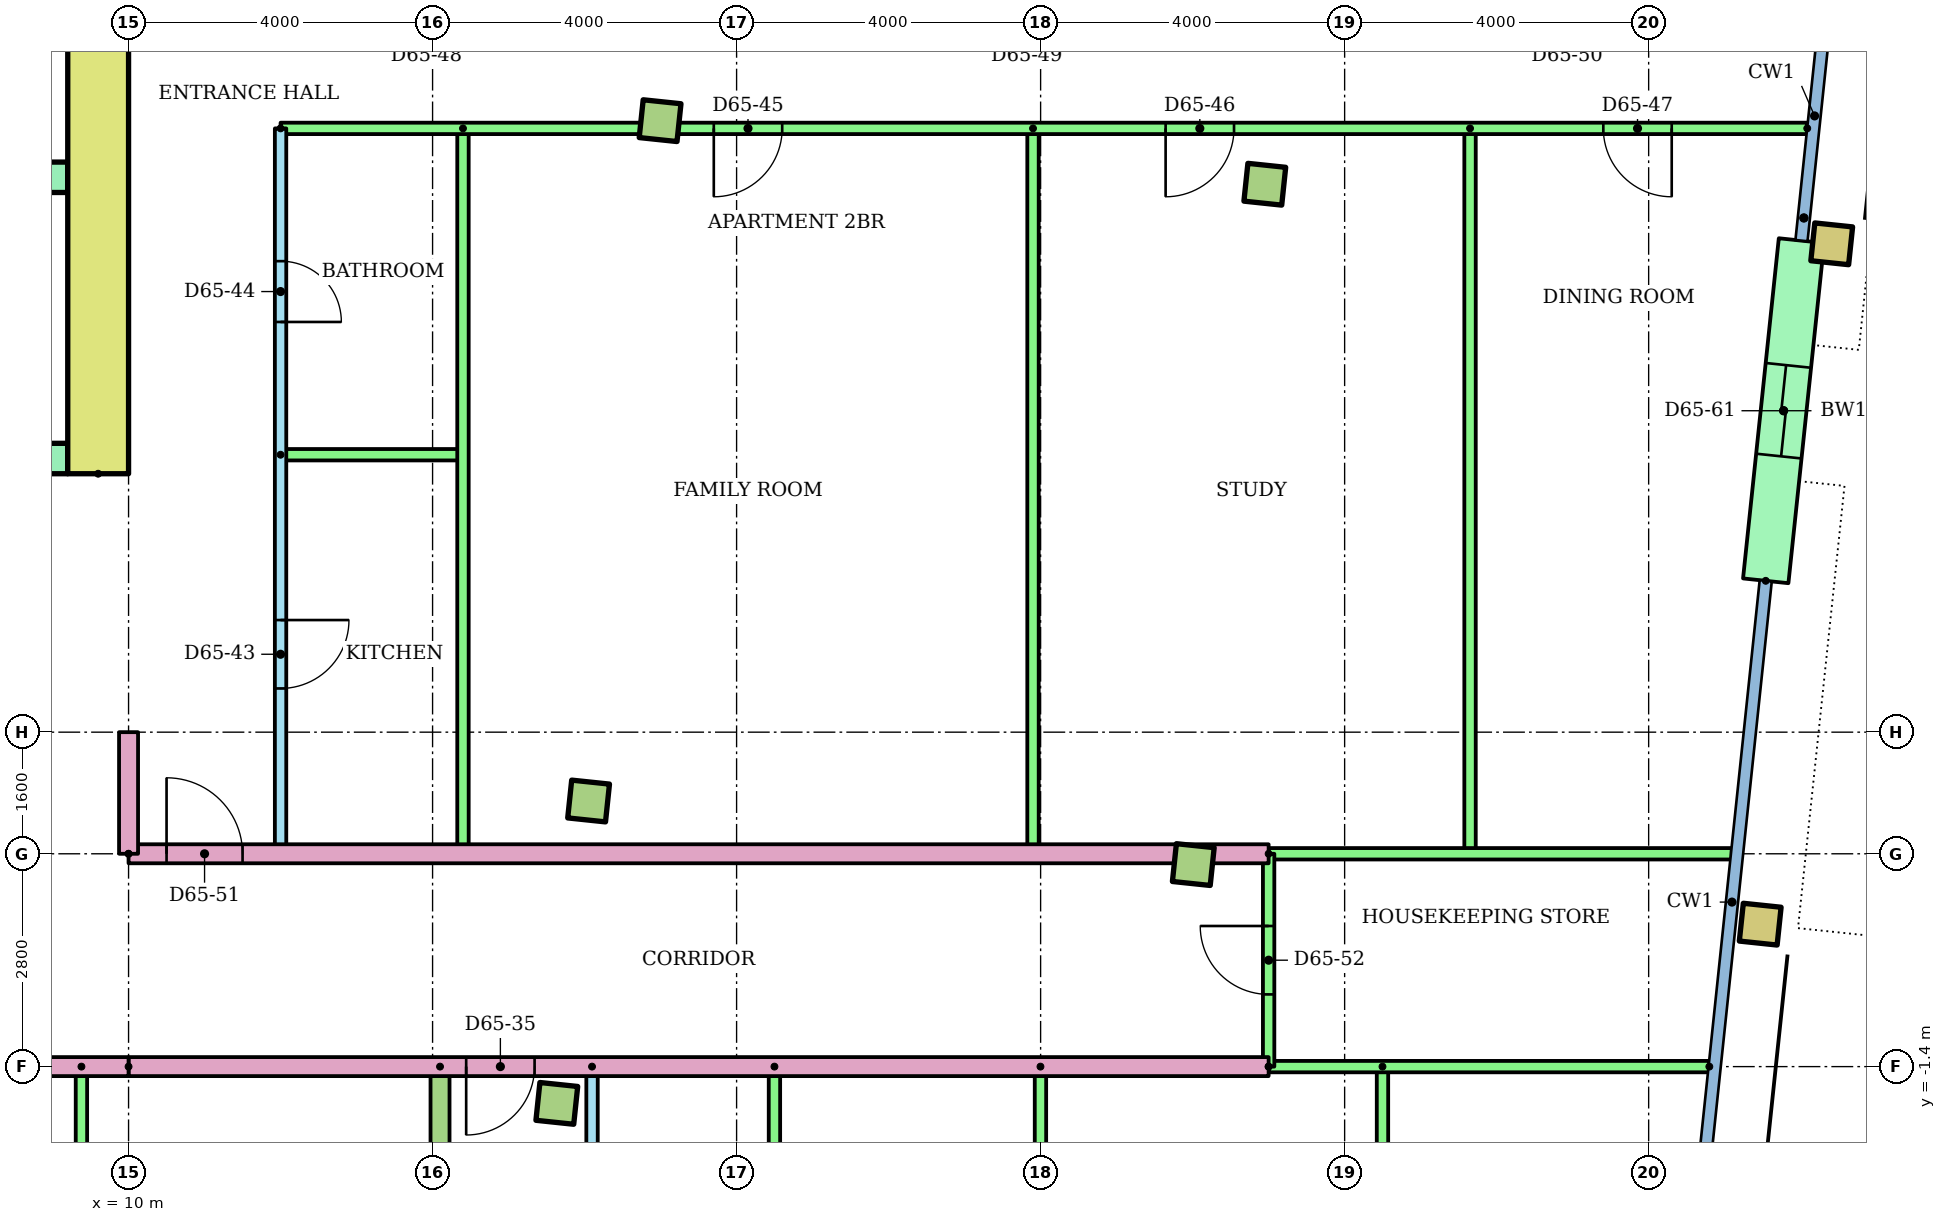
"""IFC4 building model, lengths in metres.
Left out: names, types, materials, properties, quantities, classifications, styles, units other than length and angle.
Written with IfcOpenShell. Run it as: python <this file> out.ifc"""

import sys

from ifc_helpers import new_model, si_unit, direction, frame, frame_2d, origin, origin_2d, place, context, subcontext, project, spatial, rectangle, hollow_rectangle, extrude, element, fill, save


model = new_model("IFC4")
c1 = context("Model", 3, precision=1e-05, world=origin(), true_north=direction((0.0, 1.0)))
c2 = subcontext(c1, "Body", "Model", "MODEL_VIEW")
j1 = project(units=[si_unit("LENGTHUNIT", "METRE"), si_unit("PLANEANGLEUNIT", "RADIAN")], contexts=[c1])
p1 = place(None, origin())
s1 = spatial("IfcSite", under=j1, at=p1, CompositionType="ELEMENT")
p2 = place(p1, origin())
s2 = spatial("IfcBuilding", under=s1, at=p2, CompositionType="ELEMENT")
p3 = place(p2, frame((0.0, 0.0, 253.1)))
s3 = spatial("IfcBuildingStorey", under=s2, at=p3, CompositionType="ELEMENT", Elevation=253.1)
for number, where, z_axis, x_axis in (
    (1, (15.635, -1.884, 0.0), (0.0, 0.0, 1.0), (0.995, -0.105, 0.0)),
    (2, (16.053, 2.094, 0.0), (0.0, 0.0, 1.0), (0.995, -0.105, 0.0)),
    (3, (24.009, 1.258, 0.0), (0.0, 0.0, 1.0), (0.995, -0.105, 0.0)),
):
    element("IfcColumn", number, at=place(p3, frame(where, z_axis=z_axis, x_axis=x_axis)), inside=s3, PredefinedType="COLUMN", context=c2, shape_type="SweptSolid", body=[
        extrude(rectangle(XDim=0.5, YDim=0.5, at=origin_2d()), origin(), (0.0, 0.0, 1.0), 3.2),
    ])
p4 = place(p3, frame((31.468, 0.474, 0.0), z_axis=(0.0, 0.0, 1.0), x_axis=(0.994521895368, -0.104528463268, 0.0)))
e4 = element("IfcColumn", 4, at=p4, inside=s3, PredefinedType="COLUMN", context=c2, shape_type="SweptSolid", body=[
    extrude(hollow_rectangle(XDim=0.5, YDim=0.5, WallThickness=0.025, at=origin_2d()), origin(), (0.0, 0.0, 1.0), 3.2),
])
for number, where, z_axis, x_axis in (
    (5, (16.993, 11.045, 0.0), (0.0, 0.0, 1.0), (0.995, -0.105, 0.0)),
    (6, (24.95, 10.209, 0.0), (0.0, 0.0, 1.0), (0.995, -0.105, 0.0)),
):
    element("IfcColumn", number, at=place(p3, frame(where, z_axis=z_axis, x_axis=x_axis)), inside=s3, PredefinedType="COLUMN", context=c2, shape_type="SweptSolid", body=[
        extrude(rectangle(XDim=0.5, YDim=0.5, at=origin_2d()), origin(), (0.0, 0.0, 1.0), 3.2),
    ])
p5 = place(p3, frame((32.409, 9.425, 0.0), z_axis=(0.0, 0.0, 1.0), x_axis=(0.994521895368, -0.104528463268, 0.0)))
e7 = element("IfcColumn", 7, at=p5, inside=s3, PredefinedType="COLUMN", context=c2, shape_type="SweptSolid", body=[
    extrude(hollow_rectangle(XDim=0.5, YDim=0.5, WallThickness=0.025, at=origin_2d()), origin(), (0.0, 0.0, 1.0), 3.2),
])
p6 = place(p3, frame((31.54, 4.991, 0.0), z_axis=(0.0, 0.0, 1.0), x_axis=(0.104546400045, 0.994520009974, 0.0)))
e8 = element("IfcWall", 8, at=p6, inside=s3, PredefinedType="STANDARD", context=c2, shape_type="SweptSolid", body=[
    extrude(rectangle(XDim=4.5, YDim=0.6, at=frame_2d((2.25, 0.0))), origin(), (0.0, 0.0, 1.0), 2.92),
])
p7 = place(p6, frame((1.65, 0.0, 0.0)))
e9 = element("IfcOpeningElement", 9, at=p7, cuts=e8, PredefinedType="OPENING", context=c2, shape_type="SweptSolid", body=[
    extrude(rectangle(XDim=1.2, YDim=2.1, at=frame_2d((0.6, 1.05))), frame((0.0, 0.31, 0.0), z_axis=(0.0, -1.0, 0.0), x_axis=(1.0, 0.0, 0.0)), (0.0, 0.0, 1.0), 0.62),
])
p8 = place(p3, frame((9.6, 6.4, 0.0), z_axis=(0.0, 0.0, 1.0), x_axis=(0.0, 1.0, 0.0)))
e10 = element("IfcWall", 10, at=p8, inside=s3, PredefinedType="SHEAR", context=c2, shape_type="SweptSolid", body=[
    extrude(rectangle(XDim=13.6, YDim=0.8, at=frame_2d((6.8, 0.0))), origin(), (0.0, 0.0, 1.0), 2.92),
])
p9 = place(p3, frame((-9.2, 6.6, 0.0)))
e11 = element("IfcWall", 11, at=p9, inside=s3, PredefinedType="SHEAR", context=c2, shape_type="SweptSolid", body=[
    extrude(rectangle(XDim=18.4, YDim=0.4, at=frame_2d((9.2, 0.0))), origin(), (0.0, 0.0, 1.0), 2.92),
])
p10 = place(p9, frame((8.3, 0.0, 0.0)))
e12 = element("IfcOpeningElement", 12, at=p10, cuts=e11, PredefinedType="OPENING", context=c2, shape_type="SweptSolid", body=[
    extrude(rectangle(XDim=1.8, YDim=2.1, at=frame_2d((0.9, 1.05))), frame((0.0, 0.21, 0.0), z_axis=(0.0, -1.0, 0.0), x_axis=(1.0, 0.0, 0.0)), (0.0, 0.0, 1.0), 0.42),
])
p11 = place(p9, frame((3.8, 0.0, 0.0)))
e13 = element("IfcOpeningElement", 13, at=p11, cuts=e11, PredefinedType="OPENING", context=c2, shape_type="SweptSolid", body=[
    extrude(rectangle(XDim=1.8, YDim=2.1, at=frame_2d((0.9, 1.05))), frame((0.0, 0.21, 0.0), z_axis=(0.0, -1.0, 0.0), x_axis=(1.0, 0.0, 0.0)), (0.0, 0.0, 1.0), 0.42),
])
p12 = place(p9, frame((12.8, 0.0, 0.0)))
e14 = element("IfcOpeningElement", 14, at=p12, cuts=e11, PredefinedType="OPENING", context=c2, shape_type="SweptSolid", body=[
    extrude(rectangle(XDim=1.8, YDim=2.1, at=frame_2d((0.9, 1.05))), frame((0.0, 0.21, 0.0), z_axis=(0.0, -1.0, 0.0), x_axis=(1.0, 0.0, 0.0)), (0.0, 0.0, 1.0), 0.42),
])
p13 = place(p3, frame((1.2, 10.3, 0.0)))
e15 = element("IfcWall", 15, at=p13, inside=s3, PredefinedType="SHEAR", context=c2, shape_type="SweptSolid", body=[
    extrude(rectangle(XDim=8.0, YDim=0.4, at=frame_2d((4.0, 0.0))), origin(), (0.0, 0.0, 1.0), 2.92),
])
p14 = place(p13, frame((0.817, 0.0, 0.0)))
e16 = element("IfcOpeningElement", 16, at=p14, cuts=e15, PredefinedType="OPENING", context=c2, shape_type="SweptSolid", body=[
    extrude(rectangle(XDim=1.1, YDim=2.1, at=frame_2d((0.55, 1.05))), frame((0.0, 0.21, 0.0), z_axis=(0.0, -1.0, 0.0), x_axis=(1.0, 0.0, 0.0)), (0.0, 0.0, 1.0), 0.42),
])
p15 = place(p13, frame((3.55, 0.0, 0.0)))
e17 = element("IfcOpeningElement", 17, at=p15, cuts=e15, PredefinedType="OPENING", context=c2, shape_type="SweptSolid", body=[
    extrude(rectangle(XDim=1.1, YDim=2.1, at=frame_2d((0.55, 1.05))), frame((0.0, 0.21, 0.0), z_axis=(0.0, -1.0, 0.0), x_axis=(1.0, 0.0, 0.0)), (0.0, 0.0, 1.0), 0.42),
])
p16 = place(p13, frame((6.283, 0.0, 0.0)))
e18 = element("IfcOpeningElement", 18, at=p16, cuts=e15, PredefinedType="OPENING", context=c2, shape_type="SweptSolid", body=[
    extrude(rectangle(XDim=1.1, YDim=2.1, at=frame_2d((0.55, 1.05))), frame((0.0, 0.21, 0.0), z_axis=(0.0, -1.0, 0.0), x_axis=(1.0, 0.0, 0.0)), (0.0, 0.0, 1.0), 0.42),
])
p17 = place(p3, frame((9.38, -1.4, 0.0), z_axis=(0.0, 0.0, 1.0), x_axis=(0.0, -1.0, 0.0)))
e19 = element("IfcWall", 19, at=p17, inside=s3, PredefinedType="PARTITIONING", context=c2, shape_type="SweptSolid", body=[
    extrude(rectangle(XDim=6.075, YDim=0.15, at=frame_2d((3.037, 0.0))), origin(), (0.0, 0.0, 1.0), 2.4),
])
p18 = place(p3, frame((16.098, -1.4, 0.0), z_axis=(0.0, 0.0, 1.0), x_axis=(0.0, -1.0, 0.0)))
e20 = element("IfcWall", 20, at=p18, inside=s3, PredefinedType="PARTITIONING", context=c2, shape_type="SweptSolid", body=[
    extrude(rectangle(XDim=7.782, YDim=0.15, at=frame_2d((3.891, 0.0))), origin(), (0.0, 0.0, 1.0), 2.4),
])
p19 = place(p18, frame((1.675, 0.0, 0.0)))
e21 = element("IfcOpeningElement", 21, at=p19, cuts=e20, PredefinedType="OPENING", context=c2, shape_type="SweptSolid", body=[
    extrude(rectangle(XDim=0.9, YDim=2.1, at=frame_2d((0.45, 1.05))), frame((0.0, 0.085, 0.0), z_axis=(0.0, -1.0, 0.0), x_axis=(1.0, 0.0, 0.0)), (0.0, 0.0, 1.0), 0.17),
])
p20 = place(p18, frame((5.616, 0.0, 0.0)))
e22 = element("IfcOpeningElement", 22, at=p20, cuts=e20, PredefinedType="OPENING", context=c2, shape_type="SweptSolid", body=[
    extrude(rectangle(XDim=0.8, YDim=2.1, at=frame_2d((0.4, 1.05))), frame((0.0, 0.085, 0.0), z_axis=(0.0, -1.0, 0.0), x_axis=(1.0, 0.0, 0.0)), (0.0, 0.0, 1.0), 0.17),
])
for number, where, z_axis, x_axis in (
    (23, (18.498, -1.4, 0.0), (0.0, 0.0, 1.0), (0.0, -1.0, 0.0)),
    (24, (21.998, -1.4, 0.0), (0.0, 0.0, 1.0), (0.0, -1.0, 0.0)),
    (25, (26.498, -1.4, 0.0), (0.0, 0.0, 1.0), (0.0, -1.0, 0.0)),
):
    element("IfcWall", number, at=place(p3, frame(where, z_axis=z_axis, x_axis=x_axis)), inside=s3, PredefinedType="PARTITIONING", context=c2, shape_type="SweptSolid", body=[
        extrude(rectangle(XDim=7.782, YDim=0.15, at=frame_2d((3.891, 0.0))), origin(), (0.0, 0.0, 1.0), 2.4),
    ])
p21 = place(p3, frame((14.098, -1.4, 0.0), z_axis=(0.0, 0.0, 1.0), x_axis=(0.0, -1.0, 0.0)))
e26 = element("IfcWall", 26, at=p21, inside=s3, PredefinedType="PARTITIONING", context=c2, shape_type="SweptSolid", body=[
    extrude(rectangle(XDim=15.013, YDim=0.25, at=frame_2d((7.506, 0.0))), origin(), (0.0, 0.0, 1.0), 2.4),
])
p22 = place(p3, frame((25.0, -1.4, 0.0), z_axis=(0.0, 0.0, 1.0), x_axis=(-1.0, 0.0, 0.0)))
e27 = element("IfcWall", 27, at=p22, inside=s3, PredefinedType="PARTITIONING", context=c2, shape_type="SweptSolid", body=[
    extrude(rectangle(XDim=15.0, YDim=0.25, at=frame_2d((7.5, 0.0))), origin(), (0.0, 0.0, 1.0), 2.4),
])
p23 = place(p22, frame((9.658, 0.0, 0.0)))
e28 = element("IfcOpeningElement", 28, at=p23, cuts=e27, PredefinedType="OPENING", context=c2, shape_type="SweptSolid", body=[
    extrude(rectangle(XDim=0.9, YDim=2.1, at=frame_2d((0.45, 1.05))), frame((0.0, 0.135, 0.0), z_axis=(0.0, -1.0, 0.0), x_axis=(1.0, 0.0, 0.0)), (0.0, 0.0, 1.0), 0.27),
])
p24 = place(p3, frame((30.798, -1.4, 0.0), z_axis=(0.0, 0.0, 1.0), x_axis=(-1.0, 0.0, 0.0)))
e29 = element("IfcWall", 29, at=p24, inside=s3, PredefinedType="PARTITIONING", context=c2, shape_type="SweptSolid", body=[
    extrude(rectangle(XDim=5.798, YDim=0.15, at=frame_2d((2.899, 0.0))), origin(), (0.0, 0.0, 1.0), 2.4),
])
p25 = place(p3, frame((12.0, 10.943, 0.0), z_axis=(0.0, 0.0, 1.0), x_axis=(0.0, -1.0, 0.0)))
e30 = element("IfcWall", 30, at=p25, inside=s3, PredefinedType="PARTITIONING", context=c2, shape_type="SweptSolid", body=[
    extrude(rectangle(XDim=9.543, YDim=0.15, at=frame_2d((4.772, 0.0))), origin(), (0.0, 0.0, 1.0), 2.4),
])
p26 = place(p25, frame((6.469, 0.0, 0.0)))
e31 = element("IfcOpeningElement", 31, at=p26, cuts=e30, PredefinedType="OPENING", context=c2, shape_type="SweptSolid", body=[
    extrude(rectangle(XDim=0.9, YDim=2.1, at=frame_2d((0.45, 1.05))), frame((0.0, 0.085, 0.0), z_axis=(0.0, -1.0, 0.0), x_axis=(1.0, 0.0, 0.0)), (0.0, 0.0, 1.0), 0.17),
])
p27 = place(p25, frame((1.747, 0.0, 0.0)))
e32 = element("IfcOpeningElement", 32, at=p27, cuts=e30, PredefinedType="OPENING", context=c2, shape_type="SweptSolid", body=[
    extrude(rectangle(XDim=0.8, YDim=2.1, at=frame_2d((0.4, 1.05))), frame((0.0, 0.085, 0.0), z_axis=(0.0, -1.0, 0.0), x_axis=(1.0, 0.0, 0.0)), (0.0, 0.0, 1.0), 0.17),
])
p28 = place(p3, frame((12.0, 6.65, 0.0)))
e33 = element("IfcWall", 33, at=p28, inside=s3, PredefinedType="PARTITIONING", context=c2, shape_type="SweptSolid", body=[
    extrude(rectangle(XDim=2.4, YDim=0.15, at=frame_2d((1.2, 0.0))), origin(), (0.0, 0.0, 1.0), 2.4),
])
for number, where, z_axis, x_axis in (
    (34, (14.4, 10.943, 0.0), (0.0, 0.0, 1.0), (0.0, -1.0, 0.0)),
    (35, (21.9, 10.943, 0.0), (0.0, 0.0, 1.0), (0.0, -1.0, 0.0)),
    (36, (27.65, 10.943, 0.0), (0.0, 0.0, 1.0), (0.0, -1.0, 0.0)),
):
    element("IfcWall", number, at=place(p3, frame(where, z_axis=z_axis, x_axis=x_axis)), inside=s3, PredefinedType="PARTITIONING", context=c2, shape_type="SweptSolid", body=[
        extrude(rectangle(XDim=9.543, YDim=0.15, at=frame_2d((4.772, 0.0))), origin(), (0.0, 0.0, 1.0), 2.4),
    ])
p29 = place(p3, frame((32.087, 10.943, 0.0), z_axis=(0.0, 0.0, 1.0), x_axis=(-1.0, 0.0, 0.0)))
e37 = element("IfcWall", 37, at=p29, inside=s3, PredefinedType="PARTITIONING", context=c2, shape_type="SweptSolid", body=[
    extrude(rectangle(XDim=20.087, YDim=0.15, at=frame_2d((10.043, 0.0))), origin(), (0.0, 0.0, 1.0), 2.4),
])
p30 = place(p29, frame((13.487, 0.0, 0.0)))
e38 = element("IfcOpeningElement", 38, at=p30, cuts=e37, PredefinedType="OPENING", context=c2, shape_type="SweptSolid", body=[
    extrude(rectangle(XDim=0.9, YDim=2.1, at=frame_2d((0.45, 1.05))), frame((0.0, 0.085, 0.0), z_axis=(0.0, -1.0, 0.0), x_axis=(1.0, 0.0, 0.0)), (0.0, 0.0, 1.0), 0.17),
])
p31 = place(p29, frame((7.542, 0.0, 0.0)))
e39 = element("IfcOpeningElement", 39, at=p31, cuts=e37, PredefinedType="OPENING", context=c2, shape_type="SweptSolid", body=[
    extrude(rectangle(XDim=0.9, YDim=2.1, at=frame_2d((0.45, 1.05))), frame((0.0, 0.085, 0.0), z_axis=(0.0, -1.0, 0.0), x_axis=(1.0, 0.0, 0.0)), (0.0, 0.0, 1.0), 0.17),
])
p32 = place(p29, frame((1.783, 0.0, 0.0)))
e40 = element("IfcOpeningElement", 40, at=p32, cuts=e37, PredefinedType="OPENING", context=c2, shape_type="SweptSolid", body=[
    extrude(rectangle(XDim=0.9, YDim=2.1, at=frame_2d((0.45, 1.05))), frame((0.0, 0.085, 0.0), z_axis=(0.0, -1.0, 0.0), x_axis=(1.0, 0.0, 0.0)), (0.0, 0.0, 1.0), 0.17),
])
p33 = place(p3, frame((10.0, 1.4, 0.0)))
e41 = element("IfcWall", 41, at=p33, inside=s3, PredefinedType="PARTITIONING", context=c2, shape_type="SweptSolid", body=[
    extrude(rectangle(XDim=15.0, YDim=0.25, at=frame_2d((7.5, 0.0))), origin(), (0.0, 0.0, 1.0), 2.4),
])
p34 = place(p33, frame((0.5, 0.0, 0.0)))
e42 = element("IfcOpeningElement", 42, at=p34, cuts=e41, PredefinedType="OPENING", context=c2, shape_type="SweptSolid", body=[
    extrude(rectangle(XDim=1.0, YDim=2.1, at=frame_2d((0.5, 1.05))), frame((0.0, 0.135, 0.0), z_axis=(0.0, -1.0, 0.0), x_axis=(1.0, 0.0, 0.0)), (0.0, 0.0, 1.0), 0.27),
])
p35 = place(p3, frame((25.0, 1.4, 0.0)))
e43 = element("IfcWall", 43, at=p35, inside=s3, PredefinedType="PARTITIONING", context=c2, shape_type="SweptSolid", body=[
    extrude(rectangle(XDim=6.093, YDim=0.15, at=frame_2d((3.046, 0.0))), origin(), (0.0, 0.0, 1.0), 2.4),
])
p36 = place(p3, frame((25.0, -1.4, 0.0), z_axis=(0.0, 0.0, 1.0), x_axis=(0.0, 1.0, 0.0)))
e44 = element("IfcWall", 44, at=p36, inside=s3, PredefinedType="PARTITIONING", context=c2, shape_type="SweptSolid", body=[
    extrude(rectangle(XDim=2.8, YDim=0.15, at=frame_2d((1.4, 0.0))), origin(), (0.0, 0.0, 1.0), 2.4),
])
p37 = place(p36, frame((0.95, 0.0, 0.0)))
e45 = element("IfcOpeningElement", 45, at=p37, cuts=e44, PredefinedType="OPENING", context=c2, shape_type="SweptSolid", body=[
    extrude(rectangle(XDim=0.9, YDim=2.1, at=frame_2d((0.45, 1.05))), frame((0.0, 0.085, 0.0), z_axis=(0.0, -1.0, 0.0), x_axis=(1.0, 0.0, 0.0)), (0.0, 0.0, 1.0), 0.17),
])
p38 = place(p3, frame((10.0, -1.4, 0.0), z_axis=(0.0, 0.0, 1.0), x_axis=(-1.0, 0.0, 0.0)))
e46 = element("IfcWall", 46, at=p38, inside=s3, PredefinedType="PARTITIONING", context=c2, shape_type="SweptSolid", body=[
    extrude(rectangle(XDim=20.0, YDim=0.25, at=frame_2d((10.0, 0.0))), origin(), (0.0, 0.0, 1.0), 2.4),
])
p39 = place(p38, frame((18.27, 0.0, 0.0)))
e47 = element("IfcOpeningElement", 47, at=p39, cuts=e46, PredefinedType="OPENING", context=c2, shape_type="SweptSolid", body=[
    extrude(rectangle(XDim=1.0, YDim=2.1, at=frame_2d((0.5, 1.05))), frame((0.0, 0.135, 0.0), z_axis=(0.0, -1.0, 0.0), x_axis=(1.0, 0.0, 0.0)), (0.0, 0.0, 1.0), 0.27),
])
p40 = place(p3, frame((10.0, 1.4, 0.0), z_axis=(0.0, 0.0, 1.0), x_axis=(0.0, 1.0, 0.0)))
e48 = element("IfcWall", 48, at=p40, inside=s3, PredefinedType="PARTITIONING", context=c2, shape_type="SweptSolid", body=[
    extrude(rectangle(XDim=1.6, YDim=0.25, at=frame_2d((0.8, 0.0))), origin(), (0.0, 0.0, 1.0), 2.4),
])
p41 = place(p23, origin())
e49 = element("IfcDoor", 49, at=p41, inside=s3, OperationType="SINGLE_SWING_RIGHT", PredefinedType="DOOR", context=c2, shape_type="SweptSolid", body=[
    extrude(rectangle(XDim=0.9, YDim=2.1, at=frame_2d((0.45, 1.05))), frame((0.0, 0.025, 0.0), z_axis=(0.0, -1.0, 0.0), x_axis=(1.0, 0.0, 0.0)), (0.0, 0.0, 1.0), 0.05),
])
fill(e28, e49)
p42 = place(p26, origin())
e50 = element("IfcDoor", 50, at=p42, inside=s3, OperationType="SINGLE_SWING_LEFT", PredefinedType="DOOR", context=c2, shape_type="SweptSolid", body=[
    extrude(rectangle(XDim=0.9, YDim=2.1, at=frame_2d((0.45, 1.05))), frame((0.0, 0.025, 0.0), z_axis=(0.0, -1.0, 0.0), x_axis=(1.0, 0.0, 0.0)), (0.0, 0.0, 1.0), 0.05),
])
fill(e31, e50)
p43 = place(p27, origin())
e51 = element("IfcDoor", 51, at=p43, inside=s3, OperationType="SINGLE_SWING_RIGHT", PredefinedType="DOOR", context=c2, shape_type="SweptSolid", body=[
    extrude(rectangle(XDim=0.8, YDim=2.1, at=frame_2d((0.4, 1.05))), frame((0.0, 0.025, 0.0), z_axis=(0.0, -1.0, 0.0), x_axis=(1.0, 0.0, 0.0)), (0.0, 0.0, 1.0), 0.05),
])
fill(e32, e51)
p44 = place(p30, origin())
e52 = element("IfcDoor", 52, at=p44, inside=s3, OperationType="SINGLE_SWING_RIGHT", PredefinedType="DOOR", context=c2, shape_type="SweptSolid", body=[
    extrude(rectangle(XDim=0.9, YDim=2.1, at=frame_2d((0.45, 1.05))), frame((0.0, 0.025, 0.0), z_axis=(0.0, -1.0, 0.0), x_axis=(1.0, 0.0, 0.0)), (0.0, 0.0, 1.0), 0.05),
])
fill(e38, e52)
p45 = place(p31, origin())
e53 = element("IfcDoor", 53, at=p45, inside=s3, OperationType="SINGLE_SWING_RIGHT", PredefinedType="DOOR", context=c2, shape_type="SweptSolid", body=[
    extrude(rectangle(XDim=0.9, YDim=2.1, at=frame_2d((0.45, 1.05))), frame((0.0, 0.025, 0.0), z_axis=(0.0, -1.0, 0.0), x_axis=(1.0, 0.0, 0.0)), (0.0, 0.0, 1.0), 0.05),
])
fill(e39, e53)
p46 = place(p32, origin())
e54 = element("IfcDoor", 54, at=p46, inside=s3, OperationType="SINGLE_SWING_LEFT", PredefinedType="DOOR", context=c2, shape_type="SweptSolid", body=[
    extrude(rectangle(XDim=0.9, YDim=2.1, at=frame_2d((0.45, 1.05))), frame((0.0, 0.025, 0.0), z_axis=(0.0, -1.0, 0.0), x_axis=(1.0, 0.0, 0.0)), (0.0, 0.0, 1.0), 0.05),
])
fill(e40, e54)
p47 = place(p34, origin())
e55 = element("IfcDoor", 55, at=p47, inside=s3, OperationType="SINGLE_SWING_LEFT", PredefinedType="DOOR", context=c2, shape_type="SweptSolid", body=[
    extrude(rectangle(XDim=1.0, YDim=2.1, at=frame_2d((0.5, 1.05))), frame((0.0, 0.025, 0.0), z_axis=(0.0, -1.0, 0.0), x_axis=(1.0, 0.0, 0.0)), (0.0, 0.0, 1.0), 0.05),
])
fill(e42, e55)
p48 = place(p37, origin())
e56 = element("IfcDoor", 56, at=p48, inside=s3, OperationType="SINGLE_SWING_RIGHT", PredefinedType="DOOR", context=c2, shape_type="SweptSolid", body=[
    extrude(rectangle(XDim=0.9, YDim=2.1, at=frame_2d((0.45, 1.05))), frame((0.0, 0.025, 0.0), z_axis=(0.0, -1.0, 0.0), x_axis=(1.0, 0.0, 0.0)), (0.0, 0.0, 1.0), 0.05),
])
fill(e45, e56)
p49 = place(p7, origin())
e57 = element("IfcDoor", 57, at=p49, inside=s3, OperationType="SLIDING_TO_LEFT", PredefinedType="DOOR", context=c2, shape_type="SweptSolid", body=[
    extrude(rectangle(XDim=1.2, YDim=2.1, at=frame_2d((0.6, 1.05))), frame((0.0, 0.025, 0.0), z_axis=(0.0, -1.0, 0.0), x_axis=(1.0, 0.0, 0.0)), (0.0, 0.0, 1.0), 0.05),
])
fill(e9, e57)
save(model, sys.argv[1])
